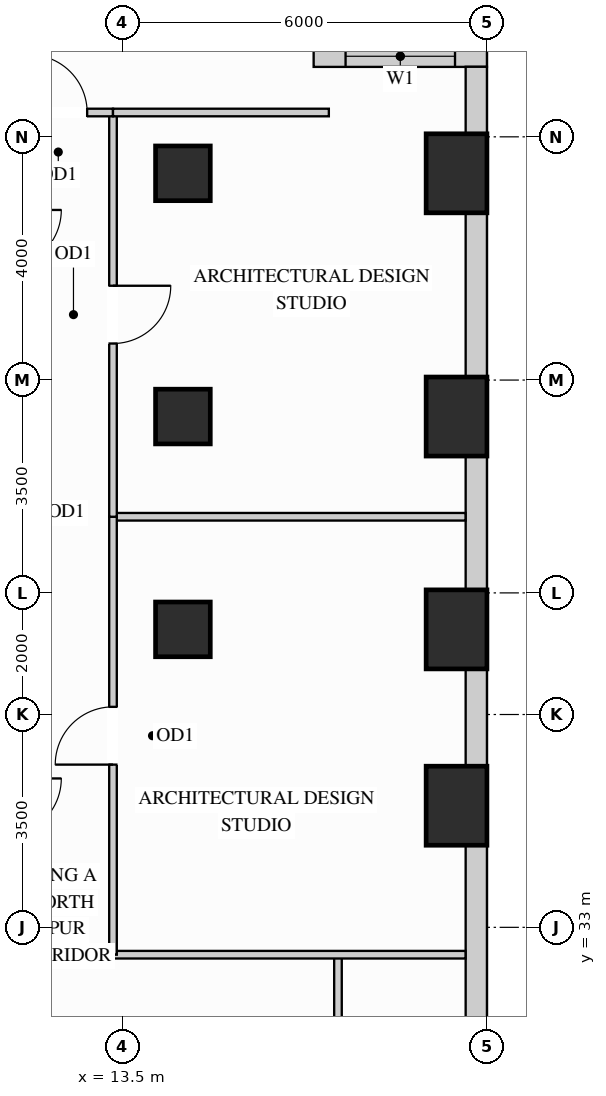
"""IFC4 building model, lengths in metres.
Left out: names, types, materials, properties, quantities, classifications, styles, units other than length and angle.
Written with IfcOpenShell. Run it as: python <this file> out.ifc"""

import sys

from ifc_helpers import new_model, si_unit, direction, frame, frame_2d, origin, origin_2d, place, context, subcontext, project, spatial, rectangle, extrude, source, transform, mapped, element, fill, save


model = new_model("IFC4")
c1 = context("Model", 3, precision=1e-05, world=origin(), true_north=direction((0.0, 1.0)))
c2 = subcontext(c1, "Body", "Model", "MODEL_VIEW")
j1 = project(units=[si_unit("LENGTHUNIT", "METRE"), si_unit("PLANEANGLEUNIT", "RADIAN")], contexts=[c1])
p1 = place(None, origin())
s1 = spatial("IfcSite", under=j1, at=p1, CompositionType="ELEMENT")
p2 = place(p1, origin())
s2 = spatial("IfcBuilding", under=s1, at=p2, CompositionType="ELEMENT")
p3 = place(p2, frame((0.0, 0.0, 47.7)))
s3 = spatial("IfcBuildingStorey", under=s2, at=p3, CompositionType="ELEMENT", Elevation=47.7)
m1 = source(origin(), c2, "Body", "SweptSolid", [
    extrude(rectangle(XDim=0.9, YDim=0.9, at=origin_2d()), origin(), (0.0, 0.0, 1.0), 3.38),
])
for number, where, z_axis, x_axis in (
    (1, (14.5, 37.9, 0.0), (0.0, 0.0, 1.0), (1.0, 0.0, 0.0)),
    (2, (14.5, 41.4, 0.0), (0.0, 0.0, 1.0), (1.0, 0.0, 0.0)),
    (3, (14.5, 45.4, 0.0), (0.0, 0.0, 1.0), (1.0, 0.0, 0.0)),
):
    element("IfcColumn", number, at=place(p3, frame(where, z_axis=z_axis, x_axis=x_axis)), inside=s3, PredefinedType="COLUMN", context=c2, shape_type="MappedRepresentation", body=[
        mapped(m1, transform((0.0, 0.0, 0.0), x_axis=(1.0, 0.0, 0.0), y_axis=(0.0, 1.0, 0.0), z_axis=(0.0, 0.0, 1.0))),
    ])
m2 = source(origin(), c2, "Body", "SweptSolid", [
    extrude(rectangle(XDim=1.0, YDim=1.3, at=origin_2d()), origin(), (0.0, 0.0, 1.0), 3.38),
])
for number, where, z_axis, x_axis in (
    (4, (19.0, 35.0, 0.0), (0.0, 0.0, 1.0), (1.0, 0.0, 0.0)),
    (5, (19.0, 37.9, 0.0), (0.0, 0.0, 1.0), (1.0, 0.0, 0.0)),
    (6, (19.0, 41.4, 0.0), (0.0, 0.0, 1.0), (1.0, 0.0, 0.0)),
    (7, (19.0, 45.4, 0.0), (0.0, 0.0, 1.0), (1.0, 0.0, 0.0)),
):
    element("IfcColumn", number, at=place(p3, frame(where, z_axis=z_axis, x_axis=x_axis)), inside=s3, PredefinedType="COLUMN", context=c2, shape_type="MappedRepresentation", body=[
        mapped(m2, transform((0.0, 0.0, 0.0), x_axis=(1.0, 0.0, 0.0), y_axis=(0.0, 1.0, 0.0), z_axis=(0.0, 0.0, 1.0))),
    ])
p4 = place(p3, frame((19.5, 47.325, 0.0), z_axis=(0.0, 0.0, 1.0), x_axis=(-1.0, 0.0, 0.0)))
e8 = element("IfcWall", 8, at=p4, inside=s3, PredefinedType="SOLIDWALL", context=c2, shape_type="SweptSolid", body=[
    extrude(rectangle(XDim=2.85, YDim=0.35, at=frame_2d((1.425, 0.0))), origin(), (0.0, 0.0, 1.0), 3.365),
])
p5 = place(p4, frame((0.525, 0.0, 0.78)))
e9 = element("IfcOpeningElement", 9, at=p5, cuts=e8, PredefinedType="OPENING", context=c2, shape_type="SweptSolid", body=[
    extrude(rectangle(XDim=1.8, YDim=2.1, at=frame_2d((0.9, 1.05))), frame((0.0, 0.185, 0.0), z_axis=(0.0, -1.0, 0.0), x_axis=(1.0, 0.0, 0.0)), (0.0, 0.0, 1.0), 0.37),
])
m3 = source(origin(), c2, "Body", "SweptSolid", [
    extrude(rectangle(XDim=3.204, YDim=0.35, at=frame_2d((1.602, 0.0))), origin(), (0.0, 0.0, 1.0), 2.51),
])
p6 = place(p3, frame((19.325, 31.148, 0.0), z_axis=(0.0, 0.0, 1.0), x_axis=(0.0, 1.0, 0.0)))
e10 = element("IfcWall", 10, at=p6, inside=s3, PredefinedType="SOLIDWALL", context=c2, shape_type="MappedRepresentation", body=[
    mapped(m3, transform((0.0, 0.0, 0.0), x_axis=(1.0, 0.0, 0.0), y_axis=(0.0, 1.0, 0.0), z_axis=(0.0, 0.0, 1.0))),
])
m4 = source(origin(), c2, "Body", "SweptSolid", [
    extrude(rectangle(XDim=1.604, YDim=0.35, at=frame_2d((0.802, 0.0))), origin(), (0.0, 0.0, 1.0), 2.51),
])
p7 = place(p3, frame((19.325, 35.648, 0.0), z_axis=(0.0, 0.0, 1.0), x_axis=(0.0, 1.0, 0.0)))
e11 = element("IfcWall", 11, at=p7, inside=s3, PredefinedType="SOLIDWALL", context=c2, shape_type="MappedRepresentation", body=[
    mapped(m4, transform((0.0, 0.0, 0.0), x_axis=(1.0, 0.0, 0.0), y_axis=(0.0, 1.0, 0.0), z_axis=(0.0, 0.0, 1.0))),
])
m5 = source(origin(), c2, "Body", "SweptSolid", [
    extrude(rectangle(XDim=2.204, YDim=0.35, at=frame_2d((1.102, 0.0))), origin(), (0.0, 0.0, 1.0), 2.51),
])
p8 = place(p3, frame((19.325, 38.548, 0.0), z_axis=(0.0, 0.0, 1.0), x_axis=(0.0, 1.0, 0.0)))
e12 = element("IfcWall", 12, at=p8, inside=s3, PredefinedType="SOLIDWALL", context=c2, shape_type="MappedRepresentation", body=[
    mapped(m5, transform((0.0, 0.0, 0.0), x_axis=(1.0, 0.0, 0.0), y_axis=(0.0, 1.0, 0.0), z_axis=(0.0, 0.0, 1.0))),
])
m6 = source(origin(), c2, "Body", "SweptSolid", [
    extrude(rectangle(XDim=2.704, YDim=0.35, at=frame_2d((1.352, 0.0))), origin(), (0.0, 0.0, 1.0), 2.51),
])
p9 = place(p3, frame((19.325, 42.048, 0.0), z_axis=(0.0, 0.0, 1.0), x_axis=(0.0, 1.0, 0.0)))
e13 = element("IfcWall", 13, at=p9, inside=s3, PredefinedType="SOLIDWALL", context=c2, shape_type="MappedRepresentation", body=[
    mapped(m6, transform((0.0, 0.0, 0.0), x_axis=(1.0, 0.0, 0.0), y_axis=(0.0, 1.0, 0.0), z_axis=(0.0, 0.0, 1.0))),
])
m7 = source(origin(), c2, "Body", "SweptSolid", [
    extrude(rectangle(XDim=1.104, YDim=0.35, at=frame_2d((0.552, 0.0))), origin(), (0.0, 0.0, 1.0), 3.365),
])
p10 = place(p3, frame((19.325, 46.048, 0.0), z_axis=(0.0, 0.0, 1.0), x_axis=(0.0, 1.0, 0.0)))
e14 = element("IfcWall", 14, at=p10, inside=s3, PredefinedType="SOLIDWALL", context=c2, shape_type="MappedRepresentation", body=[
    mapped(m7, transform((0.0, 0.0, 0.0), x_axis=(1.0, 0.0, 0.0), y_axis=(0.0, 1.0, 0.0), z_axis=(0.0, 0.0, 1.0))),
])
p11 = place(p3, frame((17.05, 26.05, 0.0), z_axis=(0.0, 0.0, 1.0), x_axis=(0.0, 1.0, 0.0)))
e15 = element("IfcWall", 15, at=p11, inside=s3, PredefinedType="PARTITIONING", context=c2, shape_type="SweptSolid", body=[
    extrude(rectangle(XDim=6.5, YDim=0.125, at=frame_2d((3.25, 0.0))), origin(), (0.0, 0.0, 1.0), 3.365),
])
p12 = place(p11, frame((2.775, 0.0, 0.0)))
e16 = element("IfcOpeningElement", 16, at=p12, cuts=e15, PredefinedType="OPENING", context=c2, shape_type="SweptSolid", body=[
    extrude(rectangle(XDim=0.95, YDim=2.15, at=frame_2d((0.475, 1.075))), frame((0.0, 0.073, 0.0), z_axis=(0.0, -1.0, 0.0), x_axis=(1.0, 0.0, 0.0)), (0.0, 0.0, 1.0), 0.145),
])
m8 = source(origin(), c2, "Body", "SweptSolid", [
    extrude(rectangle(XDim=5.798, YDim=0.125, at=frame_2d((2.899, 0.0))), origin(), (0.0, 0.0, 1.0), 2.828),
])
p13 = place(p3, frame((13.35, 39.752, 0.0), z_axis=(0.0, 0.0, 1.0), x_axis=(1.0, 0.0, 0.0)))
e17 = element("IfcWall", 17, at=p13, inside=s3, PredefinedType="PARTITIONING", context=c2, shape_type="MappedRepresentation", body=[
    mapped(m8, transform((0.0, 0.0, 0.0), x_axis=(1.0, 0.0, 0.0), y_axis=(0.0, 1.0, 0.0), z_axis=(0.0, 0.0, 1.0))),
])
m9 = source(origin(), c2, "Body", "SweptSolid", [
    extrude(rectangle(XDim=5.798, YDim=0.125, at=frame_2d((2.899, 0.0))), origin(), (0.0, 0.0, 1.0), 3.365),
])
p14 = place(p3, frame((13.35, 32.55, 0.0), z_axis=(0.0, 0.0, 1.0), x_axis=(1.0, 0.0, 0.0)))
e18 = element("IfcWall", 18, at=p14, inside=s3, PredefinedType="PARTITIONING", context=c2, shape_type="MappedRepresentation", body=[
    mapped(m9, transform((0.0, 0.0, 0.0), x_axis=(1.0, 0.0, 0.0), y_axis=(0.0, 1.0, 0.0), z_axis=(0.0, 0.0, 1.0))),
])
p15 = place(p3, frame((13.35, 32.55, 0.0), z_axis=(0.0, 0.0, 1.0), x_axis=(0.0, 1.0, 0.0)))
e19 = element("IfcWall", 19, at=p15, inside=s3, PredefinedType="PARTITIONING", context=c2, shape_type="SweptSolid", body=[
    extrude(rectangle(XDim=7.202, YDim=0.125, at=frame_2d((3.601, 0.0))), origin(), (0.0, 0.0, 1.0), 3.365),
])
p16 = place(p15, frame((3.126, 0.0, 0.0)))
e20 = element("IfcOpeningElement", 20, at=p16, cuts=e19, PredefinedType="OPENING", context=c2, shape_type="SweptSolid", body=[
    extrude(rectangle(XDim=0.95, YDim=2.15, at=frame_2d((0.475, 1.075))), frame((0.0, 0.073, 0.0), z_axis=(0.0, -1.0, 0.0), x_axis=(1.0, 0.0, 0.0)), (0.0, 0.0, 1.0), 0.145),
])
p17 = place(p3, frame((13.35, 39.752, 0.0), z_axis=(0.0, 0.0, 1.0), x_axis=(0.0, 1.0, 0.0)))
e21 = element("IfcWall", 21, at=p17, inside=s3, PredefinedType="PARTITIONING", context=c2, shape_type="SweptSolid", body=[
    extrude(rectangle(XDim=6.648, YDim=0.125, at=frame_2d((3.324, 0.0))), origin(), (0.0, 0.0, 1.0), 3.365),
])
p18 = place(p17, frame((2.849, 0.0, 0.0)))
e22 = element("IfcOpeningElement", 22, at=p18, cuts=e21, PredefinedType="OPENING", context=c2, shape_type="SweptSolid", body=[
    extrude(rectangle(XDim=0.95, YDim=2.15, at=frame_2d((0.475, 1.075))), frame((0.0, 0.073, 0.0), z_axis=(0.0, -1.0, 0.0), x_axis=(1.0, 0.0, 0.0)), (0.0, 0.0, 1.0), 0.145),
])
p19 = place(p3, frame((11.55, 46.4, 0.0), z_axis=(0.0, 0.0, 1.0), x_axis=(1.0, 0.0, 0.0)))
e23 = element("IfcWall", 23, at=p19, inside=s3, PredefinedType="PARTITIONING", context=c2, shape_type="SweptSolid", body=[
    extrude(rectangle(XDim=1.8, YDim=0.125, at=frame_2d((0.9, 0.0))), origin(), (0.0, 0.0, 1.0), 3.365),
])
p20 = place(p19, frame((0.425, 0.0, 0.0)))
e24 = element("IfcOpeningElement", 24, at=p20, cuts=e23, PredefinedType="OPENING", context=c2, shape_type="SweptSolid", body=[
    extrude(rectangle(XDim=0.95, YDim=2.15, at=frame_2d((0.475, 1.075))), frame((0.0, 0.073, 0.0), z_axis=(0.0, -1.0, 0.0), x_axis=(1.0, 0.0, 0.0)), (0.0, 0.0, 1.0), 0.145),
])
m10 = source(origin(), c2, "Body", "SweptSolid", [
    extrude(rectangle(XDim=3.55, YDim=0.125, at=frame_2d((1.775, 0.0))), origin(), (0.0, 0.0, 1.0), 3.365),
])
p21 = place(p3, frame((13.35, 46.4, 0.0), z_axis=(0.0, 0.0, 1.0), x_axis=(1.0, 0.0, 0.0)))
e25 = element("IfcWall", 25, at=p21, inside=s3, PredefinedType="PARTITIONING", context=c2, shape_type="MappedRepresentation", body=[
    mapped(m10, transform((0.0, 0.0, 0.0), x_axis=(1.0, 0.0, 0.0), y_axis=(0.0, 1.0, 0.0), z_axis=(0.0, 0.0, 1.0))),
])
m11 = source(origin(), c2, "Body", "SweptSolid", [
    extrude(rectangle(XDim=0.95, YDim=2.15, at=frame_2d((0.475, 1.075))), frame((0.0, 0.025, 0.0), z_axis=(0.0, -1.0, 0.0), x_axis=(1.0, 0.0, 0.0)), (0.0, 0.0, 1.0), 0.05),
])
p22 = place(p16, origin())
e26 = element("IfcDoor", 26, at=p22, inside=s3, OperationType="SINGLE_SWING_LEFT", PredefinedType="DOOR", context=c2, shape_type="MappedRepresentation", body=[
    mapped(m11, transform((0.0, 0.0, 0.0), x_axis=(1.0, 0.0, 0.0), y_axis=(0.0, 1.0, 0.0), z_axis=(0.0, 0.0, 1.0))),
])
fill(e20, e26)
p23 = place(p18, origin())
e27 = element("IfcDoor", 27, at=p23, inside=s3, OperationType="SINGLE_SWING_RIGHT", PredefinedType="DOOR", context=c2, shape_type="MappedRepresentation", body=[
    mapped(m11, transform((0.0, 0.0, 0.0), x_axis=(1.0, 0.0, 0.0), y_axis=(0.0, 1.0, 0.0), z_axis=(0.0, 0.0, 1.0))),
])
fill(e22, e27)
p24 = place(p20, origin())
e28 = element("IfcDoor", 28, at=p24, inside=s3, OperationType="SINGLE_SWING_LEFT", PredefinedType="DOOR", context=c2, shape_type="MappedRepresentation", body=[
    mapped(m11, transform((0.0, 0.0, 0.0), x_axis=(1.0, 0.0, 0.0), y_axis=(0.0, 1.0, 0.0), z_axis=(0.0, 0.0, 1.0))),
])
fill(e24, e28)
m12 = source(origin(), c2, "Body", "SweptSolid", [
    extrude(rectangle(XDim=1.8, YDim=2.1, at=frame_2d((0.9, 1.05))), frame((0.0, 0.03, 0.0), z_axis=(0.0, -1.0, 0.0), x_axis=(1.0, 0.0, 0.0)), (0.0, 0.0, 1.0), 0.06),
])
p25 = place(p5, origin())
e29 = element("IfcWindow", 29, at=p25, inside=s3, PartitioningType="SINGLE_PANEL", PredefinedType="WINDOW", context=c2, shape_type="MappedRepresentation", body=[
    mapped(m12, transform((0.0, 0.0, 0.0), x_axis=(1.0, 0.0, 0.0), y_axis=(0.0, 1.0, 0.0), z_axis=(0.0, 0.0, 1.0))),
])
fill(e9, e29)
save(model, sys.argv[1])
